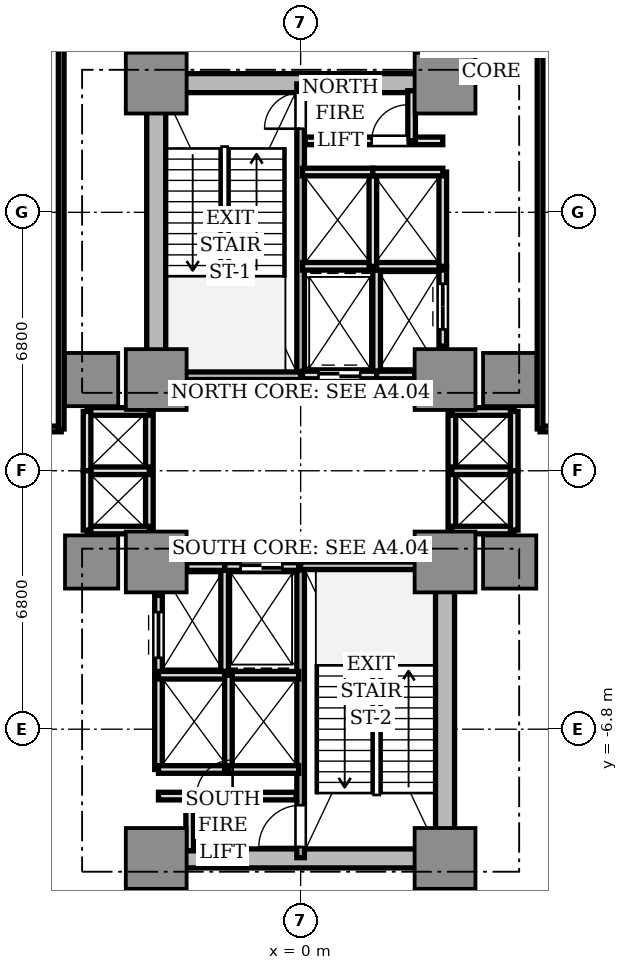
"""IFC4 building model, lengths in metres.
Left out: names, types, materials, properties, quantities, classifications, styles, units other than length and angle.
Written with IfcOpenShell. Run it as: python <this file> out.ifc"""

import sys

from ifc_helpers import new_model, si_unit, direction, frame, frame_2d, origin, origin_2d, place, context, subcontext, project, spatial, rectangle, extrude, source, transform, mapped, element, fill, save


model = new_model("IFC4")
c1 = context("Model", 3, precision=1e-05, world=origin(), true_north=direction((0.0, 1.0)))
c2 = subcontext(c1, "Body", "Model", "MODEL_VIEW")
j1 = project(units=[si_unit("LENGTHUNIT", "METRE"), si_unit("PLANEANGLEUNIT", "RADIAN")], contexts=[c1])
p1 = place(None, origin())
s1 = spatial("IfcSite", under=j1, at=p1, CompositionType="ELEMENT")
p2 = place(p1, origin())
s2 = spatial("IfcBuilding", under=s1, at=p2, CompositionType="ELEMENT")
p3 = place(p2, frame((0.0, 0.0, 4.8)))
s3 = spatial("IfcBuildingStorey", under=s2, at=p3, CompositionType="ELEMENT", Elevation=4.8)
p4 = place(p3, frame((-3.55, 10.2, 0.0), z_axis=(0.0, 0.0, 1.0), x_axis=(1.0, 0.0, 0.0)))
e1 = element("IfcWall", 1, at=p4, inside=s3, PredefinedType="SHEAR", context=c2, shape_type="SweptSolid", body=[
    extrude(rectangle(XDim=7.1, YDim=0.5, at=frame_2d((3.55, 0.0))), origin(), (0.0, 0.0, 1.0), 4.1),
])
p5 = place(p3, frame((-3.8, 2.85, 0.0), z_axis=(0.0, 0.0, 1.0), x_axis=(0.0, 1.0, 0.0)))
e2 = element("IfcWall", 2, at=p5, inside=s3, PredefinedType="SHEAR", context=c2, shape_type="SweptSolid", body=[
    extrude(rectangle(XDim=6.9, YDim=0.5, at=frame_2d((3.45, 0.0))), origin(), (0.0, 0.0, 1.0), 4.1),
])
p6 = place(p3, frame((-3.55, -10.2, 0.0), z_axis=(0.0, 0.0, 1.0), x_axis=(1.0, 0.0, 0.0)))
e3 = element("IfcWall", 3, at=p6, inside=s3, PredefinedType="SHEAR", context=c2, shape_type="SweptSolid", body=[
    extrude(rectangle(XDim=7.1, YDim=0.5, at=frame_2d((3.55, 0.0))), origin(), (0.0, 0.0, 1.0), 4.1),
])
p7 = place(p3, frame((3.8, -9.75, 0.0), z_axis=(0.0, 0.0, 1.0), x_axis=(0.0, 1.0, 0.0)))
e4 = element("IfcWall", 4, at=p7, inside=s3, PredefinedType="SHEAR", context=c2, shape_type="SweptSolid", body=[
    extrude(rectangle(XDim=6.9, YDim=0.5, at=frame_2d((3.45, 0.0))), origin(), (0.0, 0.0, 1.0), 4.1),
])
m1 = source(origin(), c2, "Body", "SweptSolid", [
    extrude(rectangle(XDim=1.6, YDim=1.6, at=origin_2d()), origin(), (0.0, 0.0, 1.0), 4.1),
])
for number, where, z_axis, x_axis in (
    (5, (-3.8, 2.4, 0.0), (0.0, 0.0, 1.0), (1.0, 0.0, 0.0)),
    (6, (3.8, 2.4, 0.0), (0.0, 0.0, 1.0), (1.0, 0.0, 0.0)),
    (7, (-3.8, 10.2, 0.0), (0.0, 0.0, 1.0), (1.0, 0.0, 0.0)),
    (8, (3.8, 10.2, 0.0), (0.0, 0.0, 1.0), (1.0, 0.0, 0.0)),
    (9, (-3.8, -2.4, 0.0), (0.0, 0.0, 1.0), (1.0, 0.0, 0.0)),
    (10, (3.8, -2.4, 0.0), (0.0, 0.0, 1.0), (1.0, 0.0, 0.0)),
    (11, (-3.8, -10.2, 0.0), (0.0, 0.0, 1.0), (1.0, 0.0, 0.0)),
    (12, (3.8, -10.2, 0.0), (0.0, 0.0, 1.0), (1.0, 0.0, 0.0)),
):
    element("IfcColumn", number, at=place(p3, frame(where, z_axis=z_axis, x_axis=x_axis)), inside=s3, PredefinedType="COLUMN", context=c2, shape_type="MappedRepresentation", body=[
        mapped(m1, transform((0.0, 0.0, 0.0), scale=1.0)),
    ])
m2 = source(origin(), c2, "Body", "SweptSolid", [
    extrude(rectangle(XDim=1.4, YDim=1.4, at=origin_2d()), origin(), (0.0, 0.0, 1.0), 4.1),
])
for number, where, z_axis, x_axis in (
    (13, (5.5, 2.4, 0.0), (0.0, 0.0, 1.0), (1.0, 0.0, 0.0)),
    (14, (-5.5, 2.4, 0.0), (0.0, 0.0, 1.0), (1.0, 0.0, 0.0)),
    (15, (5.5, -2.4, 0.0), (0.0, 0.0, 1.0), (1.0, 0.0, 0.0)),
    (16, (-5.5, -2.4, 0.0), (0.0, 0.0, 1.0), (1.0, 0.0, 0.0)),
):
    element("IfcColumn", number, at=place(p3, frame(where, z_axis=z_axis, x_axis=x_axis)), inside=s3, PredefinedType="COLUMN", context=c2, shape_type="MappedRepresentation", body=[
        mapped(m2, transform((0.0, 0.0, 0.0), scale=1.0)),
    ])
p8 = place(p3, frame((0.0, 2.5, 0.0), z_axis=(0.0, 0.0, 1.0), x_axis=(0.0, 1.0, 0.0)))
e17 = element("IfcWall", 17, at=p8, inside=s3, PredefinedType="SOLIDWALL", context=c2, shape_type="SweptSolid", body=[
    extrude(rectangle(XDim=7.68, YDim=0.2, at=frame_2d((3.84, 0.0))), origin(), (0.0, 0.0, 1.0), 4.1),
])
p9 = place(p8, frame((6.5, 0.0, 0.0)))
e18 = element("IfcOpeningElement", 18, at=p9, cuts=e17, PredefinedType="OPENING", context=c2, shape_type="SweptSolid", body=[
    extrude(rectangle(XDim=0.95, YDim=2.15, at=frame_2d((0.475, 1.075))), frame((0.0, 0.11, 0.0), z_axis=(0.0, -1.0, 0.0), x_axis=(1.0, 0.0, 0.0)), (0.0, 0.0, 1.0), 0.22),
])
p10 = place(p3, frame((-3.72, 2.5, 0.0), z_axis=(0.0, 0.0, 1.0), x_axis=(1.0, 0.0, 0.0)))
e19 = element("IfcWall", 19, at=p10, inside=s3, PredefinedType="SOLIDWALL", context=c2, shape_type="SweptSolid", body=[
    extrude(rectangle(XDim=3.72, YDim=0.2, at=frame_2d((1.86, 0.0))), origin(), (0.0, 0.0, 1.0), 4.1),
])
p11 = place(p3, frame((0.0, -10.18, 0.0), z_axis=(0.0, 0.0, 1.0), x_axis=(0.0, 1.0, 0.0)))
e20 = element("IfcWall", 20, at=p11, inside=s3, PredefinedType="SOLIDWALL", context=c2, shape_type="SweptSolid", body=[
    extrude(rectangle(XDim=7.68, YDim=0.2, at=frame_2d((3.84, 0.0))), origin(), (0.0, 0.0, 1.0), 4.1),
])
p12 = place(p11, frame((0.28, 0.0, 0.0)))
e21 = element("IfcOpeningElement", 21, at=p12, cuts=e20, PredefinedType="OPENING", context=c2, shape_type="SweptSolid", body=[
    extrude(rectangle(XDim=1.1, YDim=2.15, at=frame_2d((0.55, 1.075))), frame((0.0, 0.11, 0.0), z_axis=(0.0, -1.0, 0.0), x_axis=(1.0, 0.0, 0.0)), (0.0, 0.0, 1.0), 0.22),
])
p13 = place(p3, frame((0.0, -2.5, 0.0), z_axis=(0.0, 0.0, 1.0), x_axis=(1.0, 0.0, 0.0)))
e22 = element("IfcWall", 22, at=p13, inside=s3, PredefinedType="SOLIDWALL", context=c2, shape_type="SweptSolid", body=[
    extrude(rectangle(XDim=3.72, YDim=0.2, at=frame_2d((1.86, 0.0))), origin(), (0.0, 0.0, 1.0), 4.1),
])
p14 = place(p3, frame((2.0, 2.5, 0.0), z_axis=(0.0, 0.0, 1.0), x_axis=(0.0, 1.0, 0.0)))
e23 = element("IfcWall", 23, at=p14, inside=s3, PredefinedType="SOLIDWALL", context=c2, shape_type="SweptSolid", body=[
    extrude(rectangle(XDim=2.78, YDim=0.2, at=frame_2d((1.39, 0.0))), origin(), (0.0, 0.0, 1.0), 3.65),
])
p15 = place(p3, frame((0.05, 2.52, 0.0), z_axis=(0.0, 0.0, 1.0), x_axis=(1.0, 0.0, 0.0)))
e24 = element("IfcWall", 24, at=p15, inside=s3, PredefinedType="SOLIDWALL", context=c2, shape_type="SweptSolid", body=[
    extrude(rectangle(XDim=1.95, YDim=0.2, at=frame_2d((0.975, 0.0))), origin(), (0.0, 0.0, 1.0), 3.65),
])
p16 = place(p15, frame((0.42, 0.0, 0.0)))
e25 = element("IfcOpeningElement", 25, at=p16, cuts=e24, PredefinedType="OPENING", context=c2, shape_type="SweptSolid", body=[
    extrude(rectangle(XDim=1.1, YDim=2.2, at=frame_2d((0.55, 1.1))), frame((0.0, 0.11, 0.0), z_axis=(0.0, -1.0, 0.0), x_axis=(1.0, 0.0, 0.0)), (0.0, 0.0, 1.0), 0.22),
])
p17 = place(p3, frame((-2.0, -5.28, 0.0), z_axis=(0.0, 0.0, 1.0), x_axis=(0.0, 1.0, 0.0)))
e26 = element("IfcWall", 26, at=p17, inside=s3, PredefinedType="SOLIDWALL", context=c2, shape_type="SweptSolid", body=[
    extrude(rectangle(XDim=2.78, YDim=0.2, at=frame_2d((1.39, 0.0))), origin(), (0.0, 0.0, 1.0), 3.65),
])
p18 = place(p3, frame((-2.0, -2.52, 0.0), z_axis=(0.0, 0.0, 1.0), x_axis=(1.0, 0.0, 0.0)))
e27 = element("IfcWall", 27, at=p18, inside=s3, PredefinedType="SOLIDWALL", context=c2, shape_type="SweptSolid", body=[
    extrude(rectangle(XDim=1.95, YDim=0.2, at=frame_2d((0.975, 0.0))), origin(), (0.0, 0.0, 1.0), 3.65),
])
p19 = place(p18, frame((0.42, 0.0, 0.0)))
e28 = element("IfcOpeningElement", 28, at=p19, cuts=e27, PredefinedType="OPENING", context=c2, shape_type="SweptSolid", body=[
    extrude(rectangle(XDim=1.1, YDim=2.2, at=frame_2d((0.55, 1.1))), frame((0.0, 0.11, 0.0), z_axis=(0.0, -1.0, 0.0), x_axis=(1.0, 0.0, 0.0)), (0.0, 0.0, 1.0), 0.22),
])
p20 = place(p3, frame((2.0, 2.52, 0.0), z_axis=(0.0, 0.0, 1.0), x_axis=(1.0, 0.0, 0.0)))
e29 = element("IfcWall", 29, at=p20, inside=s3, PredefinedType="SOLIDWALL", context=c2, shape_type="SweptSolid", body=[
    extrude(rectangle(XDim=1.0, YDim=0.2, at=frame_2d((0.5, 0.0))), origin(), (0.0, 0.0, 1.0), 3.65),
])
p21 = place(p3, frame((3.74, 3.28, 0.0), z_axis=(0.0, 0.0, 1.0), x_axis=(0.0, 1.0, 0.0)))
e30 = element("IfcWall", 30, at=p21, inside=s3, PredefinedType="SOLIDWALL", context=c2, shape_type="SweptSolid", body=[
    extrude(rectangle(XDim=2.08, YDim=0.2, at=frame_2d((1.04, 0.0))), origin(), (0.0, 0.0, 1.0), 3.65),
])
p22 = place(p21, frame((0.44, 0.0, 0.0)))
e31 = element("IfcOpeningElement", 31, at=p22, cuts=e30, PredefinedType="OPENING", context=c2, shape_type="SweptSolid", body=[
    extrude(rectangle(XDim=1.2, YDim=2.2, at=frame_2d((0.6, 1.1))), frame((0.0, 0.11, 0.0), z_axis=(0.0, -1.0, 0.0), x_axis=(1.0, 0.0, 0.0)), (0.0, 0.0, 1.0), 0.22),
])
p23 = place(p3, frame((-3.0, -2.52, 0.0), z_axis=(0.0, 0.0, 1.0), x_axis=(1.0, 0.0, 0.0)))
e32 = element("IfcWall", 32, at=p23, inside=s3, PredefinedType="SOLIDWALL", context=c2, shape_type="SweptSolid", body=[
    extrude(rectangle(XDim=1.0, YDim=0.2, at=frame_2d((0.5, 0.0))), origin(), (0.0, 0.0, 1.0), 3.65),
])
p24 = place(p3, frame((-3.74, -5.36, 0.0), z_axis=(0.0, 0.0, 1.0), x_axis=(0.0, 1.0, 0.0)))
e33 = element("IfcWall", 33, at=p24, inside=s3, PredefinedType="SOLIDWALL", context=c2, shape_type="SweptSolid", body=[
    extrude(rectangle(XDim=2.08, YDim=0.2, at=frame_2d((1.04, 0.0))), origin(), (0.0, 0.0, 1.0), 3.65),
])
p25 = place(p24, frame((0.44, 0.0, 0.0)))
e34 = element("IfcOpeningElement", 34, at=p25, cuts=e33, PredefinedType="OPENING", context=c2, shape_type="SweptSolid", body=[
    extrude(rectangle(XDim=1.2, YDim=2.2, at=frame_2d((0.6, 1.1))), frame((0.0, 0.11, 0.0), z_axis=(0.0, -1.0, 0.0), x_axis=(1.0, 0.0, 0.0)), (0.0, 0.0, 1.0), 0.22),
])
p26 = place(p3, frame((0.05, 5.38, 0.0), z_axis=(0.0, 0.0, 1.0), x_axis=(1.0, 0.0, 0.0)))
e35 = element("IfcWall", 35, at=p26, inside=s3, PredefinedType="SOLIDWALL", context=c2, shape_type="SweptSolid", body=[
    extrude(rectangle(XDim=3.69, YDim=0.2, at=frame_2d((1.845, 0.0))), origin(), (0.0, 0.0, 1.0), 3.65),
])
p27 = place(p3, frame((1.9, 5.38, 0.0), z_axis=(0.0, 0.0, 1.0), x_axis=(0.0, 1.0, 0.0)))
e36 = element("IfcWall", 36, at=p27, inside=s3, PredefinedType="SOLIDWALL", context=c2, shape_type="SweptSolid", body=[
    extrude(rectangle(XDim=2.48, YDim=0.2, at=frame_2d((1.24, 0.0))), origin(), (0.0, 0.0, 1.0), 3.65),
])
p28 = place(p3, frame((0.05, 7.86, 0.0), z_axis=(0.0, 0.0, 1.0), x_axis=(1.0, 0.0, 0.0)))
e37 = element("IfcWall", 37, at=p28, inside=s3, PredefinedType="SOLIDWALL", context=c2, shape_type="SweptSolid", body=[
    extrude(rectangle(XDim=1.85, YDim=0.2, at=frame_2d((0.925, 0.0))), origin(), (0.0, 0.0, 1.0), 3.65),
])
p29 = place(p3, frame((3.74, 5.38, 0.0), z_axis=(0.0, 0.0, 1.0), x_axis=(0.0, 1.0, 0.0)))
e38 = element("IfcWall", 38, at=p29, inside=s3, PredefinedType="SOLIDWALL", context=c2, shape_type="SweptSolid", body=[
    extrude(rectangle(XDim=2.48, YDim=0.2, at=frame_2d((1.24, 0.0))), origin(), (0.0, 0.0, 1.0), 3.65),
])
p30 = place(p3, frame((1.9, 7.86, 0.0), z_axis=(0.0, 0.0, 1.0), x_axis=(1.0, 0.0, 0.0)))
e39 = element("IfcWall", 39, at=p30, inside=s3, PredefinedType="SOLIDWALL", context=c2, shape_type="SweptSolid", body=[
    extrude(rectangle(XDim=1.84, YDim=0.2, at=frame_2d((0.92, 0.0))), origin(), (0.0, 0.0, 1.0), 3.65),
])
p31 = place(p3, frame((-3.74, -7.86, 0.0), z_axis=(0.0, 0.0, 1.0), x_axis=(0.0, 1.0, 0.0)))
e40 = element("IfcWall", 40, at=p31, inside=s3, PredefinedType="SOLIDWALL", context=c2, shape_type="SweptSolid", body=[
    extrude(rectangle(XDim=2.48, YDim=0.2, at=frame_2d((1.24, 0.0))), origin(), (0.0, 0.0, 1.0), 3.65),
])
p32 = place(p3, frame((-3.74, -7.86, 0.0), z_axis=(0.0, 0.0, 1.0), x_axis=(1.0, 0.0, 0.0)))
e41 = element("IfcWall", 41, at=p32, inside=s3, PredefinedType="SOLIDWALL", context=c2, shape_type="SweptSolid", body=[
    extrude(rectangle(XDim=1.84, YDim=0.2, at=frame_2d((0.92, 0.0))), origin(), (0.0, 0.0, 1.0), 3.65),
])
p33 = place(p3, frame((-3.74, -5.38, 0.0), z_axis=(0.0, 0.0, 1.0), x_axis=(1.0, 0.0, 0.0)))
e42 = element("IfcWall", 42, at=p33, inside=s3, PredefinedType="SOLIDWALL", context=c2, shape_type="SweptSolid", body=[
    extrude(rectangle(XDim=3.69, YDim=0.2, at=frame_2d((1.845, 0.0))), origin(), (0.0, 0.0, 1.0), 3.65),
])
p34 = place(p3, frame((-1.9, -7.86, 0.0), z_axis=(0.0, 0.0, 1.0), x_axis=(0.0, 1.0, 0.0)))
e43 = element("IfcWall", 43, at=p34, inside=s3, PredefinedType="SOLIDWALL", context=c2, shape_type="SweptSolid", body=[
    extrude(rectangle(XDim=2.48, YDim=0.2, at=frame_2d((1.24, 0.0))), origin(), (0.0, 0.0, 1.0), 3.65),
])
p35 = place(p3, frame((-1.9, -7.86, 0.0), z_axis=(0.0, 0.0, 1.0), x_axis=(1.0, 0.0, 0.0)))
e44 = element("IfcWall", 44, at=p35, inside=s3, PredefinedType="SOLIDWALL", context=c2, shape_type="SweptSolid", body=[
    extrude(rectangle(XDim=1.85, YDim=0.2, at=frame_2d((0.925, 0.0))), origin(), (0.0, 0.0, 1.0), 3.65),
])
p36 = place(p3, frame((3.98, -1.56, 0.0), z_axis=(0.0, 0.0, 1.0), x_axis=(0.0, 1.0, 0.0)))
e45 = element("IfcWall", 45, at=p36, inside=s3, PredefinedType="SOLIDWALL", context=c2, shape_type="SweptSolid", body=[
    extrude(rectangle(XDim=3.12, YDim=0.2, at=frame_2d((1.56, 0.0))), origin(), (0.0, 0.0, 1.0), 3.17),
])
for number, where, z_axis, x_axis in (
    (46, (3.98, 1.56, 0.0), (0.0, 0.0, 1.0), (1.0, 0.0, 0.0)),
    (47, (3.98, -1.56, 0.0), (0.0, 0.0, 1.0), (1.0, 0.0, 0.0)),
    (48, (3.98, 0.0, 0.0), (0.0, 0.0, 1.0), (1.0, 0.0, 0.0)),
):
    element("IfcWall", number, at=place(p3, frame(where, z_axis=z_axis, x_axis=x_axis)), inside=s3, PredefinedType="SOLIDWALL", context=c2, shape_type="SweptSolid", body=[
        extrude(rectangle(XDim=1.64, YDim=0.2, at=frame_2d((0.82, 0.0))), origin(), (0.0, 0.0, 1.0), 3.65),
    ])
for number, where, z_axis, x_axis in (
    (49, (5.62, 0.0, 0.0), (0.0, 0.0, 1.0), (0.0, 1.0, 0.0)),
    (50, (5.62, -1.56, 0.0), (0.0, 0.0, 1.0), (0.0, 1.0, 0.0)),
):
    element("IfcWall", number, at=place(p3, frame(where, z_axis=z_axis, x_axis=x_axis)), inside=s3, PredefinedType="SOLIDWALL", context=c2, shape_type="SweptSolid", body=[
        extrude(rectangle(XDim=1.56, YDim=0.2, at=frame_2d((0.78, 0.0))), origin(), (0.0, 0.0, 1.0), 3.65),
    ])
p37 = place(p3, frame((-3.98, -1.56, 0.0), z_axis=(0.0, 0.0, 1.0), x_axis=(0.0, 1.0, 0.0)))
e51 = element("IfcWall", 51, at=p37, inside=s3, PredefinedType="SOLIDWALL", context=c2, shape_type="SweptSolid", body=[
    extrude(rectangle(XDim=3.12, YDim=0.2, at=frame_2d((1.56, 0.0))), origin(), (0.0, 0.0, 1.0), 3.17),
])
for number, where, z_axis, x_axis in (
    (52, (-5.62, 1.56, 0.0), (0.0, 0.0, 1.0), (1.0, 0.0, 0.0)),
    (53, (-5.62, -1.56, 0.0), (0.0, 0.0, 1.0), (1.0, 0.0, 0.0)),
    (54, (-5.62, 0.0, 0.0), (0.0, 0.0, 1.0), (1.0, 0.0, 0.0)),
):
    element("IfcWall", number, at=place(p3, frame(where, z_axis=z_axis, x_axis=x_axis)), inside=s3, PredefinedType="SOLIDWALL", context=c2, shape_type="SweptSolid", body=[
        extrude(rectangle(XDim=1.64, YDim=0.2, at=frame_2d((0.82, 0.0))), origin(), (0.0, 0.0, 1.0), 3.65),
    ])
for number, where, z_axis, x_axis in (
    (55, (-5.62, 0.0, 0.0), (0.0, 0.0, 1.0), (0.0, 1.0, 0.0)),
    (56, (-5.62, -1.56, 0.0), (0.0, 0.0, 1.0), (0.0, 1.0, 0.0)),
):
    element("IfcWall", number, at=place(p3, frame(where, z_axis=z_axis, x_axis=x_axis)), inside=s3, PredefinedType="SOLIDWALL", context=c2, shape_type="SweptSolid", body=[
        extrude(rectangle(XDim=1.56, YDim=0.2, at=frame_2d((0.78, 0.0))), origin(), (0.0, 0.0, 1.0), 3.65),
    ])
p38 = place(p3, frame((0.12, 8.68, 0.0), z_axis=(0.0, 0.0, 1.0), x_axis=(1.0, 0.0, 0.0)))
e57 = element("IfcWall", 57, at=p38, inside=s3, PredefinedType="SOLIDWALL", context=c2, shape_type="SweptSolid", body=[
    extrude(rectangle(XDim=3.62, YDim=0.2, at=frame_2d((1.81, 0.0))), origin(), (0.0, 0.0, 1.0), 3.65),
])
p39 = place(p38, frame((1.75, 0.0, 0.0)))
e58 = element("IfcOpeningElement", 58, at=p39, cuts=e57, PredefinedType="OPENING", context=c2, shape_type="SweptSolid", body=[
    extrude(rectangle(XDim=0.95, YDim=2.15, at=frame_2d((0.475, 1.075))), frame((0.0, 0.11, 0.0), z_axis=(0.0, -1.0, 0.0), x_axis=(1.0, 0.0, 0.0)), (0.0, 0.0, 1.0), 0.22),
])
p40 = place(p3, frame((2.92, 8.68, 0.0), z_axis=(0.0, 0.0, 1.0), x_axis=(0.0, 1.0, 0.0)))
e59 = element("IfcWall", 59, at=p40, inside=s3, PredefinedType="SOLIDWALL", context=c2, shape_type="SweptSolid", body=[
    extrude(rectangle(XDim=1.32, YDim=0.2, at=frame_2d((0.66, 0.0))), origin(), (0.0, 0.0, 1.0), 3.65),
])
p41 = place(p3, frame((-3.74, -8.56, 0.0), z_axis=(0.0, 0.0, 1.0), x_axis=(1.0, 0.0, 0.0)))
e60 = element("IfcWall", 60, at=p41, inside=s3, PredefinedType="SOLIDWALL", context=c2, shape_type="SweptSolid", body=[
    extrude(rectangle(XDim=3.62, YDim=0.2, at=frame_2d((1.81, 0.0))), origin(), (0.0, 0.0, 1.0), 3.65),
])
p42 = place(p41, frame((1.0, 0.0, 0.0)))
e61 = element("IfcOpeningElement", 61, at=p42, cuts=e60, PredefinedType="OPENING", context=c2, shape_type="SweptSolid", body=[
    extrude(rectangle(XDim=0.95, YDim=2.15, at=frame_2d((0.475, 1.075))), frame((0.0, 0.11, 0.0), z_axis=(0.0, -1.0, 0.0), x_axis=(1.0, 0.0, 0.0)), (0.0, 0.0, 1.0), 0.22),
])
p43 = place(p3, frame((-2.92, -10.0, 0.0), z_axis=(0.0, 0.0, 1.0), x_axis=(0.0, 1.0, 0.0)))
e62 = element("IfcWall", 62, at=p43, inside=s3, PredefinedType="SOLIDWALL", context=c2, shape_type="SweptSolid", body=[
    extrude(rectangle(XDim=1.44, YDim=0.2, at=frame_2d((0.72, 0.0))), origin(), (0.0, 0.0, 1.0), 3.65),
])
p44 = place(p3, frame((-13.9, 1.1, 0.0), z_axis=(0.0, 0.0, 1.0), x_axis=(1.0, 0.0, 0.0)))
e63 = element("IfcWall", 63, at=p44, inside=s3, PredefinedType="PARTITIONING", context=c2, shape_type="SweptSolid", body=[
    extrude(rectangle(XDim=7.6, YDim=0.15, at=frame_2d((3.8, 0.0))), origin(), (0.0, 0.0, 1.0), 3.65),
])
p45 = place(p44, frame((2.8, 0.0, 0.0)))
e64 = element("IfcOpeningElement", 64, at=p45, cuts=e63, PredefinedType="OPENING", context=c2, shape_type="SweptSolid", body=[
    extrude(rectangle(XDim=1.1, YDim=2.15, at=frame_2d((0.55, 1.075))), frame((0.0, 0.085, 0.0), z_axis=(0.0, -1.0, 0.0), x_axis=(1.0, 0.0, 0.0)), (0.0, 0.0, 1.0), 0.17),
])
p46 = place(p3, frame((-6.3, 1.1, 0.0), z_axis=(0.0, 0.0, 1.0), x_axis=(0.0, 1.0, 0.0)))
e65 = element("IfcWall", 65, at=p46, inside=s3, PredefinedType="PARTITIONING", context=c2, shape_type="SweptSolid", body=[
    extrude(rectangle(XDim=12.8, YDim=0.15, at=frame_2d((6.4, 0.0))), origin(), (0.0, 0.0, 1.0), 3.65),
])
p47 = place(p3, frame((6.3, 1.1, 0.0), z_axis=(0.0, 0.0, 1.0), x_axis=(1.0, 0.0, 0.0)))
e66 = element("IfcWall", 66, at=p47, inside=s3, PredefinedType="PARTITIONING", context=c2, shape_type="SweptSolid", body=[
    extrude(rectangle(XDim=7.6, YDim=0.15, at=frame_2d((3.8, 0.0))), origin(), (0.0, 0.0, 1.0), 3.65),
])
p48 = place(p47, frame((2.8, 0.0, 0.0)))
e67 = element("IfcOpeningElement", 67, at=p48, cuts=e66, PredefinedType="OPENING", context=c2, shape_type="SweptSolid", body=[
    extrude(rectangle(XDim=1.6, YDim=2.25, at=frame_2d((0.8, 1.125))), frame((0.0, 0.085, 0.0), z_axis=(0.0, -1.0, 0.0), x_axis=(1.0, 0.0, 0.0)), (0.0, 0.0, 1.0), 0.17),
])
p49 = place(p3, frame((6.3, 1.1, 0.0), z_axis=(0.0, 0.0, 1.0), x_axis=(0.0, 1.0, 0.0)))
e68 = element("IfcWall", 68, at=p49, inside=s3, PredefinedType="PARTITIONING", context=c2, shape_type="SweptSolid", body=[
    extrude(rectangle(XDim=12.8, YDim=0.15, at=frame_2d((6.4, 0.0))), origin(), (0.0, 0.0, 1.0), 3.65),
])
m3 = source(origin(), c2, "Body", "SweptSolid", [
    extrude(rectangle(XDim=1.1, YDim=0.05, at=origin_2d()), origin(), (0.0, 0.0, 1.0), 2.2),
])
p50 = place(p16, frame((0.55, 0.0, 0.0)))
e69 = element("IfcDoor", 69, at=p50, inside=s3, OperationType="DOUBLE_DOOR_SLIDING", PredefinedType="DOOR", context=c2, shape_type="MappedRepresentation", body=[
    mapped(m3, transform((0.0, 0.0, 0.0), scale=1.0)),
])
fill(e25, e69)
p51 = place(p19, frame((0.55, 0.0, 0.0)))
e70 = element("IfcDoor", 70, at=p51, inside=s3, OperationType="DOUBLE_DOOR_SLIDING", PredefinedType="DOOR", context=c2, shape_type="MappedRepresentation", body=[
    mapped(m3, transform((0.0, 0.0, 0.0), scale=1.0)),
])
fill(e28, e70)
m4 = source(origin(), c2, "Body", "SweptSolid", [
    extrude(rectangle(XDim=1.2, YDim=0.05, at=origin_2d()), origin(), (0.0, 0.0, 1.0), 2.2),
])
p52 = place(p22, frame((0.6, 0.0, 0.0)))
e71 = element("IfcDoor", 71, at=p52, inside=s3, OperationType="DOUBLE_DOOR_SLIDING", PredefinedType="DOOR", context=c2, shape_type="MappedRepresentation", body=[
    mapped(m4, transform((0.0, 0.0, 0.0), scale=1.0)),
])
fill(e31, e71)
p53 = place(p25, frame((0.6, 0.0, 0.0)))
e72 = element("IfcDoor", 72, at=p53, inside=s3, OperationType="DOUBLE_DOOR_SLIDING", PredefinedType="DOOR", context=c2, shape_type="MappedRepresentation", body=[
    mapped(m4, transform((0.0, 0.0, 0.0), scale=1.0)),
])
fill(e34, e72)
m5 = source(origin(), c2, "Body", "SweptSolid", [
    extrude(rectangle(XDim=0.95, YDim=0.05, at=origin_2d()), origin(), (0.0, 0.0, 1.0), 2.15),
])
p54 = place(p9, frame((0.475, 0.0, 0.0)))
e73 = element("IfcDoor", 73, at=p54, inside=s3, OperationType="SINGLE_SWING_LEFT", PredefinedType="DOOR", context=c2, shape_type="MappedRepresentation", body=[
    mapped(m5, transform((0.0, 0.0, 0.0), scale=1.0)),
])
fill(e18, e73)
p55 = place(p39, frame((0.475, 0.0, 0.0)))
e74 = element("IfcDoor", 74, at=p55, inside=s3, OperationType="SINGLE_SWING_RIGHT", PredefinedType="DOOR", context=c2, shape_type="MappedRepresentation", body=[
    mapped(m5, transform((0.0, 0.0, 0.0), scale=1.0)),
])
fill(e58, e74)
m6 = source(origin(), c2, "Body", "SweptSolid", [
    extrude(rectangle(XDim=1.1, YDim=0.05, at=origin_2d()), origin(), (0.0, 0.0, 1.0), 2.15),
])
p56 = place(p12, frame((0.55, 0.0, 0.0)))
e75 = element("IfcDoor", 75, at=p56, inside=s3, OperationType="SINGLE_SWING_LEFT", PredefinedType="DOOR", context=c2, shape_type="MappedRepresentation", body=[
    mapped(m6, transform((0.0, 0.0, 0.0), scale=1.0)),
])
fill(e21, e75)
p57 = place(p42, frame((0.475, 0.0, 0.0)))
e76 = element("IfcDoor", 76, at=p57, inside=s3, OperationType="SINGLE_SWING_RIGHT", PredefinedType="DOOR", context=c2, shape_type="MappedRepresentation", body=[
    mapped(m5, transform((0.0, 0.0, 0.0), scale=1.0)),
])
fill(e61, e76)
save(model, sys.argv[1])
